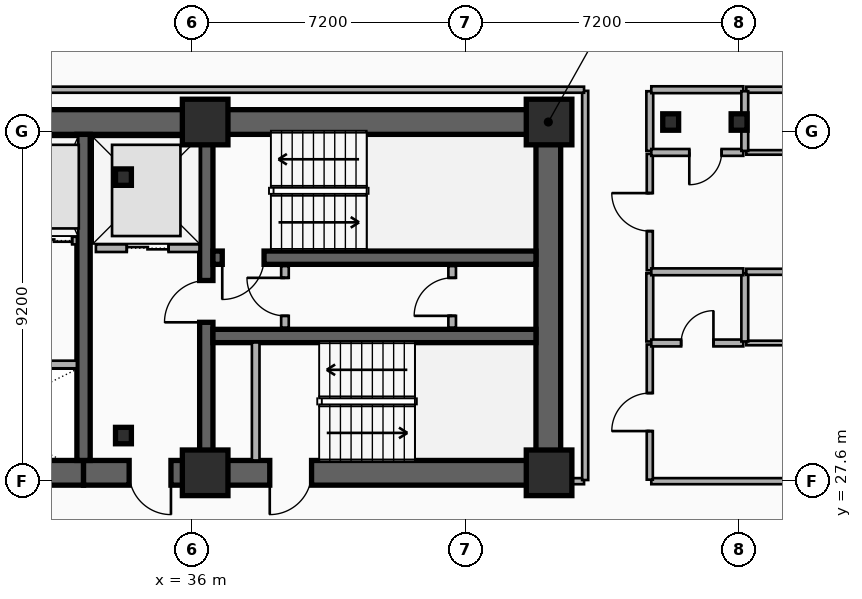
"""IFC4 building model, lengths in metres.
Left out: names, types, materials, properties, quantities, classifications, styles, units other than length and angle.
Written with IfcOpenShell. Run it as: python <this file> out.ifc"""

import sys

from ifc_helpers import new_model, si_unit, direction, frame, frame_2d, origin, origin_2d, place, context, subcontext, project, spatial, rectangle, i_section, extrude, element, fill, save


model = new_model("IFC4")
c1 = context("Model", 3, precision=1e-05, world=origin(), true_north=direction((0.0, 1.0)))
c2 = subcontext(c1, "Body", "Model", "MODEL_VIEW")
j1 = project(units=[si_unit("LENGTHUNIT", "METRE"), si_unit("PLANEANGLEUNIT", "RADIAN")], contexts=[c1])
p1 = place(None, origin())
s1 = spatial("IfcSite", under=j1, at=p1, CompositionType="ELEMENT")
p2 = place(p1, origin())
s2 = spatial("IfcBuilding", under=s1, at=p2, CompositionType="ELEMENT")
p3 = place(p2, frame((0.0, 0.0, 94.3)))
s3 = spatial("IfcBuildingStorey", under=s2, at=p3, CompositionType="ELEMENT", Elevation=94.3)
p4 = place(p3, frame((12.15, 37.05, 0.0), z_axis=(0.0, 0.0, 1.0), x_axis=(1.0, 0.0, 0.0)))
e1 = element("IfcWall", 1, at=p4, inside=s3, PredefinedType="SHEAR", context=c2, shape_type="SweptSolid", body=[
    extrude(rectangle(XDim=33.23, YDim=0.65, at=frame_2d((16.615, 0.0))), origin(), (0.0, 0.0, 1.0), 3.5),
])
p5 = place(p3, frame((33.15, 27.82, 0.0), z_axis=(0.0, 0.0, 1.0), x_axis=(-1.0, 0.0, 0.0)))
e2 = element("IfcWall", 2, at=p5, inside=s3, PredefinedType="SHEAR", context=c2, shape_type="SweptSolid", body=[
    extrude(rectangle(XDim=11.97, YDim=0.65, at=frame_2d((5.985, 0.0))), origin(), (0.0, 0.0, 1.0), 3.5),
])
p6 = place(p5, frame((6.1, 0.0, 0.0)))
e3 = element("IfcOpeningElement", 3, at=p6, cuts=e2, PredefinedType="OPENING", context=c2, shape_type="SweptSolid", body=[
    extrude(rectangle(XDim=1.6, YDim=2.2, at=frame_2d((0.8, 1.1))), frame((0.0, 0.335, 0.0), z_axis=(0.0, -1.0, 0.0), x_axis=(1.0, 0.0, 0.0)), (0.0, 0.0, 1.0), 0.67),
])
p7 = place(p3, frame((45.38, 27.82, 0.0), z_axis=(0.0, 0.0, 1.0), x_axis=(-1.0, 0.0, 0.0)))
e4 = element("IfcWall", 4, at=p7, inside=s3, PredefinedType="SHEAR", context=c2, shape_type="SweptSolid", body=[
    extrude(rectangle(XDim=12.23, YDim=0.65, at=frame_2d((6.115, 0.0))), origin(), (0.0, 0.0, 1.0), 3.5),
])
p8 = place(p7, frame((9.93, 0.0, 0.0)))
e5 = element("IfcOpeningElement", 5, at=p8, cuts=e4, PredefinedType="OPENING", context=c2, shape_type="SweptSolid", body=[
    extrude(rectangle(XDim=1.1, YDim=2.15, at=frame_2d((0.55, 1.075))), frame((0.0, 0.335, 0.0), z_axis=(0.0, -1.0, 0.0), x_axis=(1.0, 0.0, 0.0)), (0.0, 0.0, 1.0), 0.67),
])
p9 = place(p7, frame((6.23, 0.0, 0.0)))
e6 = element("IfcOpeningElement", 6, at=p9, cuts=e4, PredefinedType="OPENING", context=c2, shape_type="SweptSolid", body=[
    extrude(rectangle(XDim=1.1, YDim=2.15, at=frame_2d((0.55, 1.075))), frame((0.0, 0.335, 0.0), z_axis=(0.0, -1.0, 0.0), x_axis=(1.0, 0.0, 0.0)), (0.0, 0.0, 1.0), 0.67),
])
p10 = place(p3, frame((45.38, 28.145, 0.0), z_axis=(0.0, 0.0, 1.0), x_axis=(0.0, 1.0, 0.0)))
e7 = element("IfcWall", 7, at=p10, inside=s3, PredefinedType="SHEAR", context=c2, shape_type="SweptSolid", body=[
    extrude(rectangle(XDim=8.58, YDim=0.65, at=frame_2d((4.29, 0.0))), origin(), (0.0, 0.0, 1.0), 3.5),
])
p11 = place(p3, frame((33.15, 28.145, 0.0), z_axis=(0.0, 0.0, 1.0), x_axis=(0.0, 1.0, 0.0)))
e8 = element("IfcWall", 8, at=p11, inside=s3, PredefinedType="SHEAR", context=c2, shape_type="SweptSolid", body=[
    extrude(rectangle(XDim=8.58, YDim=0.35, at=frame_2d((4.29, 0.0))), origin(), (0.0, 0.0, 1.0), 3.5),
])
p12 = place(p3, frame((36.38, 28.145, 0.0), z_axis=(0.0, 0.0, 1.0), x_axis=(0.0, 1.0, 0.0)))
e9 = element("IfcWall", 9, at=p12, inside=s3, PredefinedType="SHEAR", context=c2, shape_type="SweptSolid", body=[
    extrude(rectangle(XDim=8.58, YDim=0.35, at=frame_2d((4.29, 0.0))), origin(), (0.0, 0.0, 1.0), 3.5),
])
p13 = place(p12, frame((3.635, 0.0, 0.0)))
e10 = element("IfcOpeningElement", 10, at=p13, cuts=e9, PredefinedType="OPENING", context=c2, shape_type="SweptSolid", body=[
    extrude(rectangle(XDim=1.1, YDim=2.15, at=frame_2d((0.55, 1.075))), frame((0.0, 0.185, 0.0), z_axis=(0.0, -1.0, 0.0), x_axis=(1.0, 0.0, 0.0)), (0.0, 0.0, 1.0), 0.37),
])
p14 = place(p3, frame((45.055, 33.48, 0.0), z_axis=(0.0, 0.0, 1.0), x_axis=(-1.0, 0.0, 0.0)))
e11 = element("IfcWall", 11, at=p14, inside=s3, PredefinedType="SHEAR", context=c2, shape_type="SweptSolid", body=[
    extrude(rectangle(XDim=8.5, YDim=0.35, at=frame_2d((4.25, 0.0))), origin(), (0.0, 0.0, 1.0), 3.5),
])
p15 = place(p14, frame((7.155, 0.0, 0.0)))
e12 = element("IfcOpeningElement", 12, at=p15, cuts=e11, PredefinedType="OPENING", context=c2, shape_type="SweptSolid", body=[
    extrude(rectangle(XDim=1.1, YDim=2.15, at=frame_2d((0.55, 1.075))), frame((0.0, 0.185, 0.0), z_axis=(0.0, -1.0, 0.0), x_axis=(1.0, 0.0, 0.0)), (0.0, 0.0, 1.0), 0.37),
])
p16 = place(p3, frame((36.555, 31.42, 0.0), z_axis=(0.0, 0.0, 1.0), x_axis=(1.0, 0.0, 0.0)))
e13 = element("IfcWall", 13, at=p16, inside=s3, PredefinedType="SHEAR", context=c2, shape_type="SweptSolid", body=[
    extrude(rectangle(XDim=8.5, YDim=0.35, at=frame_2d((4.25, 0.0))), origin(), (0.0, 0.0, 1.0), 3.5),
])
for number, where, z_axis, x_axis in (
    (14, (34.2, 28.8, 0.0), (0.0, 0.0, 1.0), (1.0, 0.0, 0.0)),
    (15, (34.2, 35.6, 0.0), (0.0, 0.0, 1.0), (1.0, 0.0, 0.0)),
):
    element("IfcColumn", number, at=place(p3, frame(where, z_axis=z_axis, x_axis=x_axis)), inside=s3, PredefinedType="COLUMN", context=c2, shape_type="SweptSolid", body=[
        extrude(i_section(OverallWidth=0.418, OverallDepth=0.432, WebThickness=0.035, FlangeThickness=0.056, FilletRadius=0.015, at=origin_2d()), origin(), (0.0, 0.0, 1.0), 3.5),
    ])
for number, where, z_axis, x_axis in (
    (16, (36.35, 27.82, 0.0), (0.0, 0.0, 1.0), (1.0, 0.0, 0.0)),
    (17, (36.35, 37.05, 0.0), (0.0, 0.0, 1.0), (1.0, 0.0, 0.0)),
    (18, (45.4, 27.82, 0.0), (0.0, 0.0, 1.0), (1.0, 0.0, 0.0)),
    (19, (45.4, 37.05, 0.0), (0.0, 0.0, 1.0), (1.0, 0.0, 0.0)),
):
    element("IfcColumn", number, at=place(p3, frame(where, z_axis=z_axis, x_axis=x_axis)), inside=s3, PredefinedType="COLUMN", context=c2, shape_type="SweptSolid", body=[
        extrude(rectangle(XDim=1.2, YDim=1.2, at=origin_2d()), origin(), (0.0, 0.0, 1.0), 3.5),
    ])
for number, where, z_axis, x_axis in (
    (20, (48.6, 37.05, 0.0), (0.0, 0.0, 1.0), (1.0, 0.0, 0.0)),
    (21, (50.4, 37.05, 0.0), (0.0, 0.0, 1.0), (1.0, 0.0, 0.0)),
):
    element("IfcColumn", number, at=place(p3, frame(where, z_axis=z_axis, x_axis=x_axis)), inside=s3, PredefinedType="COLUMN", context=c2, shape_type="SweptSolid", body=[
        extrude(i_section(OverallWidth=0.418, OverallDepth=0.432, WebThickness=0.035, FlangeThickness=0.056, FilletRadius=0.015, at=origin_2d()), origin(), (0.0, 0.0, 1.0), 3.5),
    ])
p17 = place(p3, frame((33.475, 33.73, 0.0), z_axis=(0.0, 0.0, 1.0), x_axis=(1.0, 0.0, 0.0)))
e22 = element("IfcWall", 22, at=p17, inside=s3, PredefinedType="PARTITIONING", context=c2, shape_type="SweptSolid", body=[
    extrude(rectangle(XDim=2.725, YDim=0.2, at=frame_2d((1.362, 0.0))), origin(), (0.0, 0.0, 1.0), 2.212),
])
p18 = place(p17, frame((0.812, 0.0, 0.0)))
e23 = element("IfcOpeningElement", 23, at=p18, cuts=e22, PredefinedType="OPENING", context=c2, shape_type="SweptSolid", body=[
    extrude(rectangle(XDim=1.1, YDim=2.15, at=frame_2d((0.55, 1.075))), frame((0.0, 0.11, 0.0), z_axis=(0.0, -1.0, 0.0), x_axis=(1.0, 0.0, 0.0)), (0.0, 0.0, 1.0), 0.22),
])
p19 = place(p3, frame((31.775, 30.67, 0.0), z_axis=(0.0, 0.0, 1.0), x_axis=(1.0, 0.0, 0.0)))
e24 = element("IfcWall", 24, at=p19, inside=s3, PredefinedType="PARTITIONING", context=c2, shape_type="SweptSolid", body=[
    extrude(rectangle(XDim=1.2, YDim=0.2, at=frame_2d((0.6, 0.0))), origin(), (0.0, 0.0, 1.0), 2.62),
])
p20 = place(p3, frame((31.775, 33.93, 0.0), z_axis=(0.0, 0.0, 1.0), x_axis=(1.0, 0.0, 0.0)))
e25 = element("IfcWall", 25, at=p20, inside=s3, PredefinedType="PARTITIONING", context=c2, shape_type="SweptSolid", body=[
    extrude(rectangle(XDim=1.2, YDim=0.2, at=frame_2d((0.6, 0.0))), origin(), (0.0, 0.0, 1.0), 3.24),
])
p21 = place(p20, frame((0.125, 0.0, 0.0)))
e26 = element("IfcOpeningElement", 26, at=p21, cuts=e25, PredefinedType="OPENING", context=c2, shape_type="SweptSolid", body=[
    extrude(rectangle(XDim=0.95, YDim=2.15, at=frame_2d((0.475, 1.075))), frame((0.0, 0.11, 0.0), z_axis=(0.0, -1.0, 0.0), x_axis=(1.0, 0.0, 0.0)), (0.0, 0.0, 1.0), 0.22),
])
p22 = place(p3, frame((37.68, 28.145, 0.0), z_axis=(0.0, 0.0, 1.0), x_axis=(0.0, 1.0, 0.0)))
e27 = element("IfcWall", 27, at=p22, inside=s3, PredefinedType="PARTITIONING", context=c2, shape_type="SweptSolid", body=[
    extrude(rectangle(XDim=3.105, YDim=0.2, at=frame_2d((1.552, 0.0))), origin(), (0.0, 0.0, 1.0), 2.62),
])
p23 = place(p3, frame((38.45, 31.64, 0.0), z_axis=(0.0, 0.0, 1.0), x_axis=(0.0, 1.0, 0.0)))
e28 = element("IfcWall", 28, at=p23, inside=s3, PredefinedType="PARTITIONING", context=c2, shape_type="SweptSolid", body=[
    extrude(rectangle(XDim=1.62, YDim=0.2, at=frame_2d((0.81, 0.0))), origin(), (0.0, 0.0, 1.0), 3.24),
])
p24 = place(p23, frame((0.31, 0.0, 0.0)))
e29 = element("IfcOpeningElement", 29, at=p24, cuts=e28, PredefinedType="OPENING", context=c2, shape_type="SweptSolid", body=[
    extrude(rectangle(XDim=1.0, YDim=2.15, at=frame_2d((0.5, 1.075))), frame((0.0, 0.11, 0.0), z_axis=(0.0, -1.0, 0.0), x_axis=(1.0, 0.0, 0.0)), (0.0, 0.0, 1.0), 0.22),
])
p25 = place(p3, frame((42.85, 31.64, 0.0), z_axis=(0.0, 0.0, 1.0), x_axis=(0.0, 1.0, 0.0)))
e30 = element("IfcWall", 30, at=p25, inside=s3, PredefinedType="PARTITIONING", context=c2, shape_type="SweptSolid", body=[
    extrude(rectangle(XDim=1.62, YDim=0.2, at=frame_2d((0.81, 0.0))), origin(), (0.0, 0.0, 1.0), 3.24),
])
p26 = place(p25, frame((0.31, 0.0, 0.0)))
e31 = element("IfcOpeningElement", 31, at=p26, cuts=e30, PredefinedType="OPENING", context=c2, shape_type="SweptSolid", body=[
    extrude(rectangle(XDim=1.0, YDim=2.15, at=frame_2d((0.5, 1.075))), frame((0.0, 0.11, 0.0), z_axis=(0.0, -1.0, 0.0), x_axis=(1.0, 0.0, 0.0)), (0.0, 0.0, 1.0), 0.22),
])
p27 = place(p3, frame((48.09, 27.6, 0.0), z_axis=(0.0, 0.0, 1.0), x_axis=(1.0, 0.0, 0.0)))
e32 = element("IfcWall", 32, at=p27, inside=s3, PredefinedType="PARTITIONING", context=c2, shape_type="SweptSolid", body=[
    extrude(rectangle(XDim=9.25, YDim=0.16, at=frame_2d((4.625, 0.0))), origin(), (0.0, 0.0, 1.0), 2.57),
])
p28 = place(p27, frame((4.125, 0.0, 0.0)))
e33 = element("IfcOpeningElement", 33, at=p28, cuts=e32, PredefinedType="OPENING", context=c2, shape_type="SweptSolid", body=[
    extrude(rectangle(XDim=1.0, YDim=2.15, at=frame_2d((0.5, 1.075))), frame((0.0, 0.09, 0.0), z_axis=(0.0, -1.0, 0.0), x_axis=(1.0, 0.0, 0.0)), (0.0, 0.0, 1.0), 0.18),
])
p29 = place(p3, frame((48.05, 27.64, 0.0), z_axis=(0.0, 0.0, 1.0), x_axis=(0.0, 1.0, 0.0)))
e34 = element("IfcWall", 34, at=p29, inside=s3, PredefinedType="PARTITIONING", context=c2, shape_type="SweptSolid", body=[
    extrude(rectangle(XDim=3.556, YDim=0.16, at=frame_2d((1.778, 0.0))), origin(), (0.0, 0.0, 1.0), 3.24),
])
p30 = place(p29, frame((1.278, 0.0, 0.0)))
e35 = element("IfcOpeningElement", 35, at=p30, cuts=e34, PredefinedType="OPENING", context=c2, shape_type="SweptSolid", body=[
    extrude(rectangle(XDim=1.0, YDim=2.15, at=frame_2d((0.5, 1.075))), frame((0.0, 0.09, 0.0), z_axis=(0.0, -1.0, 0.0), x_axis=(1.0, 0.0, 0.0)), (0.0, 0.0, 1.0), 0.18),
])
p31 = place(p3, frame((48.05, 31.276, 0.0), z_axis=(0.0, 0.0, 1.0), x_axis=(0.0, 1.0, 0.0)))
e36 = element("IfcWall", 36, at=p31, inside=s3, PredefinedType="PLUMBINGWALL", context=c2, shape_type="SweptSolid", body=[
    extrude(rectangle(XDim=1.793, YDim=0.18, at=frame_2d((0.896, 0.0))), origin(), (0.0, 0.0, 1.0), 3.24),
])
p32 = place(p3, frame((48.05, 33.149, 0.0), z_axis=(0.0, 0.0, 1.0), x_axis=(0.0, 1.0, 0.0)))
e37 = element("IfcWall", 37, at=p32, inside=s3, PredefinedType="PARTITIONING", context=c2, shape_type="SweptSolid", body=[
    extrude(rectangle(XDim=3.061, YDim=0.16, at=frame_2d((1.531, 0.0))), origin(), (0.0, 0.0, 1.0), 3.24),
])
p33 = place(p32, frame((1.031, 0.0, 0.0)))
e38 = element("IfcOpeningElement", 38, at=p33, cuts=e37, PredefinedType="OPENING", context=c2, shape_type="SweptSolid", body=[
    extrude(rectangle(XDim=1.0, YDim=2.15, at=frame_2d((0.5, 1.075))), frame((0.0, 0.09, 0.0), z_axis=(0.0, -1.0, 0.0), x_axis=(1.0, 0.0, 0.0)), (0.0, 0.0, 1.0), 0.18),
])
p34 = place(p3, frame((48.05, 36.29, 0.0), z_axis=(0.0, 0.0, 1.0), x_axis=(0.0, 1.0, 0.0)))
e39 = element("IfcWall", 39, at=p34, inside=s3, PredefinedType="PLUMBINGWALL", context=c2, shape_type="SweptSolid", body=[
    extrude(rectangle(XDim=1.57, YDim=0.18, at=frame_2d((0.785, 0.0))), origin(), (0.0, 0.0, 1.0), 2.72),
])
p35 = place(p3, frame((48.09, 37.9, 0.0), z_axis=(0.0, 0.0, 1.0), x_axis=(1.0, 0.0, 0.0)))
e40 = element("IfcWall", 40, at=p35, inside=s3, PredefinedType="PLUMBINGWALL", context=c2, shape_type="SweptSolid", body=[
    extrude(rectangle(XDim=2.42, YDim=0.18, at=frame_2d((1.21, 0.0))), origin(), (0.0, 0.0, 1.0), 3.24),
])
p36 = place(p3, frame((50.59, 37.9, 0.0), z_axis=(0.0, 0.0, 1.0), x_axis=(1.0, 0.0, 0.0)))
e41 = element("IfcWall", 41, at=p36, inside=s3, PredefinedType="PARTITIONING", context=c2, shape_type="SweptSolid", body=[
    extrude(rectangle(XDim=6.75, YDim=0.16, at=frame_2d((3.375, 0.0))), origin(), (0.0, 0.0, 1.0), 3.24),
])
p37 = place(p3, frame((48.09, 31.236, 0.0), z_axis=(0.0, 0.0, 1.0), x_axis=(1.0, 0.0, 0.0)))
e42 = element("IfcWall", 42, at=p37, inside=s3, PredefinedType="PLUMBINGWALL", context=c2, shape_type="SweptSolid", body=[
    extrude(rectangle(XDim=2.42, YDim=0.18, at=frame_2d((1.21, 0.0))), origin(), (0.0, 0.0, 1.0), 2.57),
])
p38 = place(p37, frame((0.785, 0.0, 0.0)))
e43 = element("IfcOpeningElement", 43, at=p38, cuts=e42, PredefinedType="OPENING", context=c2, shape_type="SweptSolid", body=[
    extrude(rectangle(XDim=0.85, YDim=2.1, at=frame_2d((0.425, 1.05))), frame((0.0, 0.1, 0.0), z_axis=(0.0, -1.0, 0.0), x_axis=(1.0, 0.0, 0.0)), (0.0, 0.0, 1.0), 0.2),
])
p39 = place(p3, frame((50.59, 31.236, 0.0), z_axis=(0.0, 0.0, 1.0), x_axis=(1.0, 0.0, 0.0)))
e44 = element("IfcWall", 44, at=p39, inside=s3, PredefinedType="PARTITIONING", context=c2, shape_type="SweptSolid", body=[
    extrude(rectangle(XDim=6.75, YDim=0.12, at=frame_2d((3.375, 0.0))), origin(), (0.0, 0.0, 1.0), 2.57),
])
p40 = place(p39, frame((2.925, 0.0, 0.0)))
e45 = element("IfcOpeningElement", 45, at=p40, cuts=e44, PredefinedType="OPENING", context=c2, shape_type="SweptSolid", body=[
    extrude(rectangle(XDim=0.9, YDim=2.1, at=frame_2d((0.45, 1.05))), frame((0.0, 0.07, 0.0), z_axis=(0.0, -1.0, 0.0), x_axis=(1.0, 0.0, 0.0)), (0.0, 0.0, 1.0), 0.14),
])
p41 = place(p3, frame((50.55, 31.276, 0.0), z_axis=(0.0, 0.0, 1.0), x_axis=(0.0, 1.0, 0.0)))
e46 = element("IfcWall", 46, at=p41, inside=s3, PredefinedType="PLUMBINGWALL", context=c2, shape_type="SweptSolid", body=[
    extrude(rectangle(XDim=1.793, YDim=0.18, at=frame_2d((0.896, 0.0))), origin(), (0.0, 0.0, 1.0), 2.57),
])
p42 = place(p3, frame((48.09, 33.109, 0.0), z_axis=(0.0, 0.0, 1.0), x_axis=(1.0, 0.0, 0.0)))
e47 = element("IfcWall", 47, at=p42, inside=s3, PredefinedType="PLUMBINGWALL", context=c2, shape_type="SweptSolid", body=[
    extrude(rectangle(XDim=2.42, YDim=0.18, at=frame_2d((1.21, 0.0))), origin(), (0.0, 0.0, 1.0), 2.57),
])
p43 = place(p3, frame((50.59, 33.109, 0.0), z_axis=(0.0, 0.0, 1.0), x_axis=(1.0, 0.0, 0.0)))
e48 = element("IfcWall", 48, at=p43, inside=s3, PredefinedType="PARTITIONING", context=c2, shape_type="SweptSolid", body=[
    extrude(rectangle(XDim=6.75, YDim=0.16, at=frame_2d((3.375, 0.0))), origin(), (0.0, 0.0, 1.0), 2.57),
])
p44 = place(p3, frame((50.51, 36.25, 0.0), z_axis=(0.0, 0.0, 1.0), x_axis=(-1.0, 0.0, 0.0)))
e49 = element("IfcWall", 49, at=p44, inside=s3, PredefinedType="PLUMBINGWALL", context=c2, shape_type="SweptSolid", body=[
    extrude(rectangle(XDim=2.42, YDim=0.18, at=frame_2d((1.21, 0.0))), origin(), (0.0, 0.0, 1.0), 2.57),
])
p45 = place(p44, frame((0.57, 0.0, 0.0)))
e50 = element("IfcOpeningElement", 50, at=p45, cuts=e49, PredefinedType="OPENING", context=c2, shape_type="SweptSolid", body=[
    extrude(rectangle(XDim=0.85, YDim=2.1, at=frame_2d((0.425, 1.05))), frame((0.0, 0.1, 0.0), z_axis=(0.0, -1.0, 0.0), x_axis=(1.0, 0.0, 0.0)), (0.0, 0.0, 1.0), 0.2),
])
p46 = place(p3, frame((50.59, 36.25, 0.0), z_axis=(0.0, 0.0, 1.0), x_axis=(1.0, 0.0, 0.0)))
e51 = element("IfcWall", 51, at=p46, inside=s3, PredefinedType="PARTITIONING", context=c2, shape_type="SweptSolid", body=[
    extrude(rectangle(XDim=6.75, YDim=0.12, at=frame_2d((3.375, 0.0))), origin(), (0.0, 0.0, 1.0), 2.57),
])
p47 = place(p46, frame((2.925, 0.0, 0.0)))
e52 = element("IfcOpeningElement", 52, at=p47, cuts=e51, PredefinedType="OPENING", context=c2, shape_type="SweptSolid", body=[
    extrude(rectangle(XDim=0.9, YDim=2.1, at=frame_2d((0.45, 1.05))), frame((0.0, 0.07, 0.0), z_axis=(0.0, -1.0, 0.0), x_axis=(1.0, 0.0, 0.0)), (0.0, 0.0, 1.0), 0.14),
])
p48 = place(p3, frame((50.55, 36.29, 0.0), z_axis=(0.0, 0.0, 1.0), x_axis=(0.0, 1.0, 0.0)))
e53 = element("IfcWall", 53, at=p48, inside=s3, PredefinedType="PLUMBINGWALL", context=c2, shape_type="SweptSolid", body=[
    extrude(rectangle(XDim=1.57, YDim=0.18, at=frame_2d((0.785, 0.0))), origin(), (0.0, 0.0, 1.0), 2.57),
])
p49 = place(p3, frame((45.41, 27.6, 0.0), z_axis=(0.0, 0.0, 1.0), x_axis=(1.0, 0.0, 0.0)))
e54 = element("IfcWall", 54, at=p49, inside=s3, PredefinedType="PARTITIONING", context=c2, shape_type="SweptSolid", body=[
    extrude(rectangle(XDim=0.91, YDim=0.16, at=frame_2d((0.455, 0.0))), origin(), (0.0, 0.0, 1.0), 2.28),
])
p50 = place(p3, frame((46.35, 27.63, 0.0), z_axis=(0.0, 0.0, 1.0), x_axis=(0.0, 1.0, 0.0)))
e55 = element("IfcWall", 55, at=p50, inside=s3, PredefinedType="PARTITIONING", context=c2, shape_type="SweptSolid", body=[
    extrude(rectangle(XDim=10.24, YDim=0.16, at=frame_2d((5.12, 0.0))), origin(), (0.0, 0.0, 1.0), 2.72),
])
p51 = place(p3, frame((11.28, 37.9, 0.0), z_axis=(0.0, 0.0, 1.0), x_axis=(1.0, 0.0, 0.0)))
e56 = element("IfcWall", 56, at=p51, inside=s3, PredefinedType="PARTITIONING", context=c2, shape_type="SweptSolid", body=[
    extrude(rectangle(XDim=35.04, YDim=0.16, at=frame_2d((17.52, 0.0))), origin(), (0.0, 0.0, 1.0), 3.24),
])
p52 = place(p18, origin())
e57 = element("IfcDoor", 57, at=p52, inside=s3, OperationType="DOUBLE_DOOR_SLIDING", PredefinedType="DOOR", context=c2, shape_type="SweptSolid", body=[
    extrude(rectangle(XDim=1.1, YDim=2.15, at=frame_2d((0.55, 1.075))), frame((0.0, 0.025, 0.0), z_axis=(0.0, -1.0, 0.0), x_axis=(1.0, 0.0, 0.0)), (0.0, 0.0, 1.0), 0.05),
])
fill(e23, e57)
p53 = place(p21, origin())
e58 = element("IfcDoor", 58, at=p53, inside=s3, OperationType="DOUBLE_DOOR_SLIDING", PredefinedType="DOOR", context=c2, shape_type="SweptSolid", body=[
    extrude(rectangle(XDim=0.95, YDim=2.15, at=frame_2d((0.475, 1.075))), frame((0.0, 0.025, 0.0), z_axis=(0.0, -1.0, 0.0), x_axis=(1.0, 0.0, 0.0)), (0.0, 0.0, 1.0), 0.05),
])
fill(e26, e58)
p54 = place(p15, origin())
e59 = element("IfcDoor", 59, at=p54, inside=s3, OperationType="SINGLE_SWING_RIGHT", PredefinedType="DOOR", context=c2, shape_type="SweptSolid", body=[
    extrude(rectangle(XDim=1.1, YDim=2.15, at=frame_2d((0.55, 1.075))), frame((0.0, 0.025, 0.0), z_axis=(0.0, -1.0, 0.0), x_axis=(1.0, 0.0, 0.0)), (0.0, 0.0, 1.0), 0.05),
])
fill(e12, e59)
p55 = place(p13, origin())
e60 = element("IfcDoor", 60, at=p55, inside=s3, OperationType="SINGLE_SWING_LEFT", PredefinedType="DOOR", context=c2, shape_type="SweptSolid", body=[
    extrude(rectangle(XDim=1.1, YDim=2.15, at=frame_2d((0.55, 1.075))), frame((0.0, 0.025, 0.0), z_axis=(0.0, -1.0, 0.0), x_axis=(1.0, 0.0, 0.0)), (0.0, 0.0, 1.0), 0.05),
])
fill(e10, e60)
p56 = place(p8, origin())
e61 = element("IfcDoor", 61, at=p56, inside=s3, OperationType="SINGLE_SWING_LEFT", PredefinedType="DOOR", context=c2, shape_type="SweptSolid", body=[
    extrude(rectangle(XDim=1.1, YDim=2.15, at=frame_2d((0.55, 1.075))), frame((0.0, 0.025, 0.0), z_axis=(0.0, -1.0, 0.0), x_axis=(1.0, 0.0, 0.0)), (0.0, 0.0, 1.0), 0.05),
])
fill(e5, e61)
p57 = place(p9, origin())
e62 = element("IfcDoor", 62, at=p57, inside=s3, OperationType="SINGLE_SWING_RIGHT", PredefinedType="DOOR", context=c2, shape_type="SweptSolid", body=[
    extrude(rectangle(XDim=1.1, YDim=2.15, at=frame_2d((0.55, 1.075))), frame((0.0, 0.025, 0.0), z_axis=(0.0, -1.0, 0.0), x_axis=(1.0, 0.0, 0.0)), (0.0, 0.0, 1.0), 0.05),
])
fill(e6, e62)
p58 = place(p24, origin())
e63 = element("IfcDoor", 63, at=p58, inside=s3, OperationType="SINGLE_SWING_RIGHT", PredefinedType="DOOR", context=c2, shape_type="SweptSolid", body=[
    extrude(rectangle(XDim=1.0, YDim=2.15, at=frame_2d((0.5, 1.075))), frame((0.0, 0.025, 0.0), z_axis=(0.0, -1.0, 0.0), x_axis=(1.0, 0.0, 0.0)), (0.0, 0.0, 1.0), 0.05),
])
fill(e29, e63)
p59 = place(p26, origin())
e64 = element("IfcDoor", 64, at=p59, inside=s3, OperationType="SINGLE_SWING_LEFT", PredefinedType="DOOR", context=c2, shape_type="SweptSolid", body=[
    extrude(rectangle(XDim=1.0, YDim=2.15, at=frame_2d((0.5, 1.075))), frame((0.0, 0.025, 0.0), z_axis=(0.0, -1.0, 0.0), x_axis=(1.0, 0.0, 0.0)), (0.0, 0.0, 1.0), 0.05),
])
fill(e31, e64)
p60 = place(p30, origin())
e65 = element("IfcDoor", 65, at=p60, inside=s3, OperationType="SINGLE_SWING_LEFT", PredefinedType="DOOR", context=c2, shape_type="SweptSolid", body=[
    extrude(rectangle(XDim=1.0, YDim=2.15, at=frame_2d((0.5, 1.075))), frame((0.0, 0.025, 0.0), z_axis=(0.0, -1.0, 0.0), x_axis=(1.0, 0.0, 0.0)), (0.0, 0.0, 1.0), 0.05),
])
fill(e35, e65)
p61 = place(p33, origin())
e66 = element("IfcDoor", 66, at=p61, inside=s3, OperationType="SINGLE_SWING_RIGHT", PredefinedType="DOOR", context=c2, shape_type="SweptSolid", body=[
    extrude(rectangle(XDim=1.0, YDim=2.15, at=frame_2d((0.5, 1.075))), frame((0.0, 0.025, 0.0), z_axis=(0.0, -1.0, 0.0), x_axis=(1.0, 0.0, 0.0)), (0.0, 0.0, 1.0), 0.05),
])
fill(e38, e66)
p62 = place(p38, origin())
e67 = element("IfcDoor", 67, at=p62, inside=s3, OperationType="SINGLE_SWING_RIGHT", PredefinedType="DOOR", context=c2, shape_type="SweptSolid", body=[
    extrude(rectangle(XDim=0.85, YDim=2.1, at=frame_2d((0.425, 1.05))), frame((0.0, 0.025, 0.0), z_axis=(0.0, -1.0, 0.0), x_axis=(1.0, 0.0, 0.0)), (0.0, 0.0, 1.0), 0.05),
])
fill(e43, e67)
p63 = place(p45, origin())
e68 = element("IfcDoor", 68, at=p63, inside=s3, OperationType="SINGLE_SWING_RIGHT", PredefinedType="DOOR", context=c2, shape_type="SweptSolid", body=[
    extrude(rectangle(XDim=0.85, YDim=2.1, at=frame_2d((0.425, 1.05))), frame((0.0, 0.025, 0.0), z_axis=(0.0, -1.0, 0.0), x_axis=(1.0, 0.0, 0.0)), (0.0, 0.0, 1.0), 0.05),
])
fill(e50, e68)
save(model, sys.argv[1])
